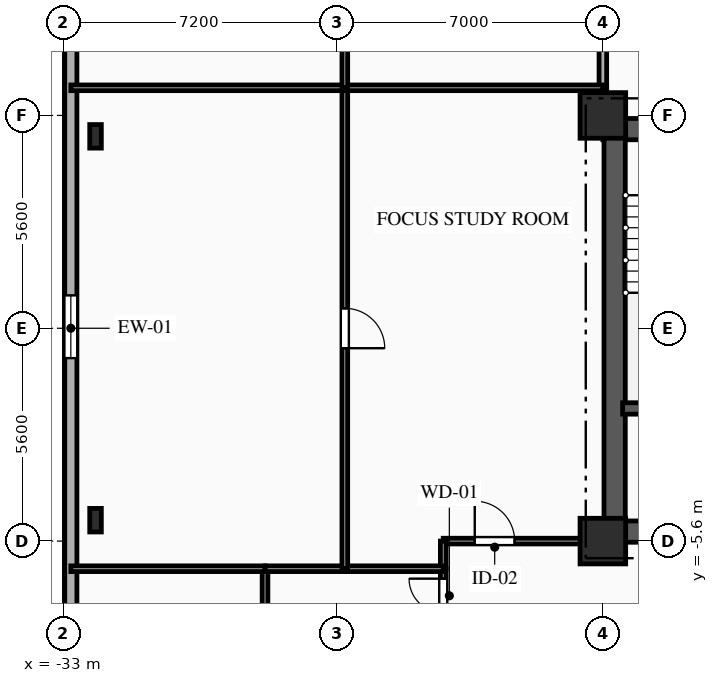
"""IFC4 building model, lengths in metres.
Left out: names, types, materials, properties, quantities, classifications, styles, units other than length and angle.
Written with IfcOpenShell. Run it as: python <this file> out.ifc"""

import sys

from ifc_helpers import new_model, si_unit, direction, frame, frame_2d, origin, origin_2d, place, context, subcontext, project, spatial, rectangle, i_section, extrude, element, fill, save


model = new_model("IFC4")
c1 = context("Model", 3, precision=1e-05, world=origin(), true_north=direction((0.0, 1.0)))
c2 = subcontext(c1, "Body", "Model", "MODEL_VIEW")
j1 = project(units=[si_unit("LENGTHUNIT", "METRE"), si_unit("PLANEANGLEUNIT", "RADIAN")], contexts=[c1])
p1 = place(None, origin())
s1 = spatial("IfcSite", under=j1, at=p1, CompositionType="ELEMENT")
p2 = place(p1, origin())
s2 = spatial("IfcBuilding", under=s1, at=p2, CompositionType="ELEMENT")
p3 = place(p2, frame((0.0, 0.0, 67.2)))
s3 = spatial("IfcBuildingStorey", under=s2, at=p3, CompositionType="ELEMENT", Elevation=67.2)
for number, where, z_axis, x_axis in (
    (1, (-18.8, -5.6, 0.0), (0.0, 0.0, 1.0), (1.0, 0.0, 0.0)),
    (2, (-18.8, 5.6, 0.0), (0.0, 0.0, 1.0), (1.0, 0.0, 0.0)),
):
    element("IfcColumn", number, at=place(p3, frame(where, z_axis=z_axis, x_axis=x_axis)), inside=s3, PredefinedType="COLUMN", context=c2, shape_type="SweptSolid", body=[
        extrude(rectangle(XDim=1.2, YDim=1.2, at=origin_2d()), origin(), (0.0, 0.0, 1.0), 3.35),
    ])
for number, where, z_axis, x_axis in (
    (3, (-32.15, 5.05, 0.0), (0.0, 0.0, 1.0), (1.0, 0.0, 0.0)),
    (4, (-32.15, -5.05, 0.0), (0.0, 0.0, 1.0), (1.0, 0.0, 0.0)),
):
    element("IfcColumn", number, at=place(p3, frame(where, z_axis=z_axis, x_axis=x_axis)), inside=s3, PredefinedType="COLUMN", context=c2, shape_type="SweptSolid", body=[
        extrude(i_section(OverallWidth=0.305, OverallDepth=0.62, WebThickness=0.021, FlangeThickness=0.04, FilletRadius=0.027, at=origin_2d()), origin(), (0.0, 0.0, 1.0), 3.35),
    ])
p4 = place(p3, frame((-32.8, -15.8, 0.0), z_axis=(0.0, 0.0, 1.0), x_axis=(0.0, 1.0, 0.0)))
e5 = element("IfcWall", 5, at=p4, inside=s3, PredefinedType="SOLIDWALL", context=c2, shape_type="SweptSolid", body=[
    extrude(rectangle(XDim=31.6, YDim=0.32, at=frame_2d((15.8, 0.0))), origin(), (0.0, 0.0, 1.0), 3.035),
])
p5 = place(p4, frame((4.175, 0.0, 0.85)))
e6 = element("IfcOpeningElement", 6, at=p5, cuts=e5, PredefinedType="OPENING", context=c2, shape_type="SweptSolid", body=[
    extrude(rectangle(XDim=1.65, YDim=1.85, at=frame_2d((0.825, 0.925))), frame((0.0, 0.17, 0.0), z_axis=(0.0, -1.0, 0.0), x_axis=(1.0, 0.0, 0.0)), (0.0, 0.0, 1.0), 0.34),
])
p6 = place(p4, frame((15.015, 0.0, 0.85)))
e7 = element("IfcOpeningElement", 7, at=p6, cuts=e5, PredefinedType="OPENING", context=c2, shape_type="SweptSolid", body=[
    extrude(rectangle(XDim=1.65, YDim=1.85, at=frame_2d((0.825, 0.925))), frame((0.0, 0.17, 0.0), z_axis=(0.0, -1.0, 0.0), x_axis=(1.0, 0.0, 0.0)), (0.0, 0.0, 1.0), 0.34),
])
p7 = place(p4, frame((25.855, 0.0, 0.85)))
e8 = element("IfcOpeningElement", 8, at=p7, cuts=e5, PredefinedType="OPENING", context=c2, shape_type="SweptSolid", body=[
    extrude(rectangle(XDim=1.65, YDim=1.85, at=frame_2d((0.825, 0.925))), frame((0.0, 0.17, 0.0), z_axis=(0.0, -1.0, 0.0), x_axis=(1.0, 0.0, 0.0)), (0.0, 0.0, 1.0), 0.34),
])
p8 = place(p3, frame((-18.8, 5.24, 0.0), z_axis=(0.0, 0.0, 1.0), x_axis=(1.0, 0.0, 0.0)))
e9 = element("IfcWall", 9, at=p8, inside=s3, PredefinedType="SHEAR", context=c2, shape_type="SweptSolid", body=[
    extrude(rectangle(XDim=9.6, YDim=0.56, at=frame_2d((4.8, 0.0))), origin(), (0.0, 0.0, 1.0), 3.035),
])
p9 = place(p8, frame((1.55, 0.0, 0.0)))
e10 = element("IfcOpeningElement", 10, at=p9, cuts=e9, PredefinedType="OPENING", context=c2, shape_type="SweptSolid", body=[
    extrude(rectangle(XDim=1.1, YDim=2.15, at=frame_2d((0.55, 1.075))), frame((0.0, 0.29, 0.0), z_axis=(0.0, -1.0, 0.0), x_axis=(1.0, 0.0, 0.0)), (0.0, 0.0, 1.0), 0.58),
])
p10 = place(p8, frame((4.775, 0.0, 0.0)))
e11 = element("IfcOpeningElement", 11, at=p10, cuts=e9, PredefinedType="OPENING", context=c2, shape_type="SweptSolid", body=[
    extrude(rectangle(XDim=1.05, YDim=2.1, at=frame_2d((0.525, 1.05))), frame((0.0, 0.29, 0.0), z_axis=(0.0, -1.0, 0.0), x_axis=(1.0, 0.0, 0.0)), (0.0, 0.0, 1.0), 0.58),
])
p11 = place(p3, frame((-18.8, -5.35, 0.0), z_axis=(0.0, 0.0, 1.0), x_axis=(1.0, 0.0, 0.0)))
e12 = element("IfcWall", 12, at=p11, inside=s3, PredefinedType="SHEAR", context=c2, shape_type="SweptSolid", body=[
    extrude(rectangle(XDim=9.6, YDim=0.56, at=frame_2d((4.8, 0.0))), origin(), (0.0, 0.0, 1.0), 3.035),
])
p12 = place(p11, frame((1.05, 0.0, 0.0)))
e13 = element("IfcOpeningElement", 13, at=p12, cuts=e12, PredefinedType="OPENING", context=c2, shape_type="SweptSolid", body=[
    extrude(rectangle(XDim=0.9, YDim=2.1, at=frame_2d((0.45, 1.05))), frame((0.0, 0.29, 0.0), z_axis=(0.0, -1.0, 0.0), x_axis=(1.0, 0.0, 0.0)), (0.0, 0.0, 1.0), 0.58),
])
p13 = place(p3, frame((-18.49, -5.05, 0.0), z_axis=(0.0, 0.0, 1.0), x_axis=(0.0, 1.0, 0.0)))
e14 = element("IfcWall", 14, at=p13, inside=s3, PredefinedType="SHEAR", context=c2, shape_type="SweptSolid", body=[
    extrude(rectangle(XDim=10.1, YDim=0.56, at=frame_2d((5.05, 0.0))), origin(), (0.0, 0.0, 1.0), 3.035),
])
p14 = place(p3, frame((-18.28, -2.11, 0.0), z_axis=(0.0, 0.0, 1.0), x_axis=(1.0, 0.0, 0.0)))
e15 = element("IfcWall", 15, at=p14, inside=s3, PredefinedType="SHEAR", context=c2, shape_type="SweptSolid", body=[
    extrude(rectangle(XDim=3.18, YDim=0.3, at=frame_2d((1.59, 0.0))), origin(), (0.0, 0.0, 1.0), 3.035),
])
p15 = place(p3, frame((-18.8, 6.327, 0.0), z_axis=(0.0, 0.0, 1.0), x_axis=(0.0, -1.0, 0.0)))
e16 = element("IfcWall", 16, at=p15, inside=s3, PredefinedType="PARTITIONING", context=c2, shape_type="SweptSolid", body=[
    extrude(rectangle(XDim=0.727, YDim=0.2, at=frame_2d((0.363, 0.0))), origin(), (0.0, 0.0, 1.0), 2.52),
])
p16 = place(p3, frame((-18.8, 8.5, 0.0), z_axis=(0.0, 0.0, 1.0), x_axis=(0.0, -1.0, 0.0)))
e17 = element("IfcWall", 17, at=p16, inside=s3, PredefinedType="PARTITIONING", context=c2, shape_type="SweptSolid", body=[
    extrude(rectangle(XDim=2.173, YDim=0.2, at=frame_2d((1.086, 0.0))), origin(), (0.0, 0.0, 1.0), 2.52),
])
p17 = place(p3, frame((-23.0, -7.75, 0.0), z_axis=(0.0, 0.0, 1.0), x_axis=(0.0, 1.0, 0.0)))
e18 = element("IfcWall", 18, at=p17, inside=s3, PredefinedType="PARTITIONING", context=c2, shape_type="SweptSolid", body=[
    extrude(rectangle(XDim=1.423, YDim=0.15, at=frame_2d((0.711, 0.0))), origin(), (0.0, 0.0, 1.0), 3.035),
])
p18 = place(p17, frame((0.261, 0.0, 0.0)))
e19 = element("IfcOpeningElement", 19, at=p18, cuts=e18, PredefinedType="OPENING", context=c2, shape_type="SweptSolid", body=[
    extrude(rectangle(XDim=0.9, YDim=2.1, at=frame_2d((0.45, 1.05))), frame((0.0, 0.085, 0.0), z_axis=(0.0, -1.0, 0.0), x_axis=(1.0, 0.0, 0.0)), (0.0, 0.0, 1.0), 0.17),
])
p19 = place(p3, frame((-23.0, -5.6, 0.0), z_axis=(0.0, 0.0, 1.0), x_axis=(1.0, 0.0, 0.0)))
e20 = element("IfcWall", 20, at=p19, inside=s3, PredefinedType="PARTITIONING", context=c2, shape_type="SweptSolid", body=[
    extrude(rectangle(XDim=4.2, YDim=0.15, at=frame_2d((2.1, 0.0))), origin(), (0.0, 0.0, 1.0), 3.035),
])
p20 = place(p19, frame((0.829, 0.0, 0.0)))
e21 = element("IfcOpeningElement", 21, at=p20, cuts=e20, PredefinedType="OPENING", context=c2, shape_type="SweptSolid", body=[
    extrude(rectangle(XDim=1.05, YDim=2.15, at=frame_2d((0.525, 1.075))), frame((0.0, 0.085, 0.0), z_axis=(0.0, -1.0, 0.0), x_axis=(1.0, 0.0, 0.0)), (0.0, 0.0, 1.0), 0.17),
])
p21 = place(p3, frame((-23.0, -6.327, 0.0), z_axis=(0.0, 0.0, 1.0), x_axis=(0.0, 1.0, 0.0)))
e22 = element("IfcWall", 22, at=p21, inside=s3, PredefinedType="PARTITIONING", context=c2, shape_type="SweptSolid", body=[
    extrude(rectangle(XDim=0.727, YDim=0.15, at=frame_2d((0.363, 0.0))), origin(), (0.0, 0.0, 1.0), 3.035),
])
p22 = place(p3, frame((-27.69, -6.327, 0.0), z_axis=(0.0, 0.0, 1.0), x_axis=(0.0, -1.0, 0.0)))
e23 = element("IfcWall", 23, at=p22, inside=s3, PredefinedType="PARTITIONING", context=c2, shape_type="SweptSolid", body=[
    extrude(rectangle(XDim=13.073, YDim=0.15, at=frame_2d((6.537, 0.0))), origin(), (0.0, 0.0, 1.0), 3.035),
])
p23 = place(p22, frame((3.296, 0.0, 0.0)))
e24 = element("IfcOpeningElement", 24, at=p23, cuts=e23, PredefinedType="OPENING", context=c2, shape_type="SweptSolid", body=[
    extrude(rectangle(XDim=1.05, YDim=2.15, at=frame_2d((0.525, 1.075))), frame((0.0, 0.085, 0.0), z_axis=(0.0, -1.0, 0.0), x_axis=(1.0, 0.0, 0.0)), (0.0, 0.0, 1.0), 0.17),
])
p24 = place(p3, frame((-32.8, -6.327, 0.0), z_axis=(0.0, 0.0, 1.0), x_axis=(1.0, 0.0, 0.0)))
e25 = element("IfcWall", 25, at=p24, inside=s3, PredefinedType="PARTITIONING", context=c2, shape_type="SweptSolid", body=[
    extrude(rectangle(XDim=5.11, YDim=0.15, at=frame_2d((2.555, 0.0))), origin(), (0.0, 0.0, 1.0), 3.035),
])
p25 = place(p3, frame((-27.69, -6.327, 0.0), z_axis=(0.0, 0.0, 1.0), x_axis=(1.0, 0.0, 0.0)))
e26 = element("IfcWall", 26, at=p25, inside=s3, PredefinedType="PARTITIONING", context=c2, shape_type="SweptSolid", body=[
    extrude(rectangle(XDim=2.1, YDim=0.15, at=frame_2d((1.05, 0.0))), origin(), (0.0, 0.0, 1.0), 3.035),
])
p26 = place(p3, frame((-25.59, -6.327, 0.0), z_axis=(0.0, 0.0, 1.0), x_axis=(1.0, 0.0, 0.0)))
e27 = element("IfcWall", 27, at=p26, inside=s3, PredefinedType="PARTITIONING", context=c2, shape_type="SweptSolid", body=[
    extrude(rectangle(XDim=2.59, YDim=0.15, at=frame_2d((1.295, 0.0))), origin(), (0.0, 0.0, 1.0), 3.035),
])
p27 = place(p3, frame((-25.59, 6.327, 0.0), z_axis=(0.0, 0.0, 1.0), x_axis=(0.0, -1.0, 0.0)))
e28 = element("IfcWall", 28, at=p27, inside=s3, PredefinedType="PARTITIONING", context=c2, shape_type="SweptSolid", body=[
    extrude(rectangle(XDim=12.654, YDim=0.15, at=frame_2d((6.327, 0.0))), origin(), (0.0, 0.0, 1.0), 2.69),
])
p28 = place(p27, frame((5.802, 0.0, 0.0)))
e29 = element("IfcOpeningElement", 29, at=p28, cuts=e28, PredefinedType="OPENING", context=c2, shape_type="SweptSolid", body=[
    extrude(rectangle(XDim=1.05, YDim=2.15, at=frame_2d((0.525, 1.075))), frame((0.0, 0.085, 0.0), z_axis=(0.0, -1.0, 0.0), x_axis=(1.0, 0.0, 0.0)), (0.0, 0.0, 1.0), 0.17),
])
p29 = place(p3, frame((-32.8, 6.327, 0.0), z_axis=(0.0, 0.0, 1.0), x_axis=(1.0, 0.0, 0.0)))
e30 = element("IfcWall", 30, at=p29, inside=s3, PredefinedType="PARTITIONING", context=c2, shape_type="SweptSolid", body=[
    extrude(rectangle(XDim=7.21, YDim=0.15, at=frame_2d((3.605, 0.0))), origin(), (0.0, 0.0, 1.0), 3.035),
])
p30 = place(p3, frame((-25.59, 6.327, 0.0), z_axis=(0.0, 0.0, 1.0), x_axis=(1.0, 0.0, 0.0)))
e31 = element("IfcWall", 31, at=p30, inside=s3, PredefinedType="PARTITIONING", context=c2, shape_type="SweptSolid", body=[
    extrude(rectangle(XDim=6.79, YDim=0.15, at=frame_2d((3.395, 0.0))), origin(), (0.0, 0.0, 1.0), 3.035),
])
p31 = place(p3, frame((-25.59, 19.4, 0.0), z_axis=(0.0, 0.0, 1.0), x_axis=(0.0, -1.0, 0.0)))
e32 = element("IfcWall", 32, at=p31, inside=s3, PredefinedType="PARTITIONING", context=c2, shape_type="SweptSolid", body=[
    extrude(rectangle(XDim=13.073, YDim=0.15, at=frame_2d((6.537, 0.0))), origin(), (0.0, 0.0, 1.0), 2.69),
])
p32 = place(p31, frame((8.727, 0.0, 0.0)))
e33 = element("IfcOpeningElement", 33, at=p32, cuts=e32, PredefinedType="OPENING", context=c2, shape_type="SweptSolid", body=[
    extrude(rectangle(XDim=1.05, YDim=2.15, at=frame_2d((0.525, 1.075))), frame((0.0, 0.085, 0.0), z_axis=(0.0, -1.0, 0.0), x_axis=(1.0, 0.0, 0.0)), (0.0, 0.0, 1.0), 0.17),
])
p33 = place(p6, origin())
e34 = element("IfcWindow", 34, at=p33, inside=s3, PartitioningType="SINGLE_PANEL", PredefinedType="WINDOW", context=c2, shape_type="SweptSolid", body=[
    extrude(rectangle(XDim=1.65, YDim=1.85, at=frame_2d((0.825, 0.925))), frame((0.0, 0.03, 0.0), z_axis=(0.0, -1.0, 0.0), x_axis=(1.0, 0.0, 0.0)), (0.0, 0.0, 1.0), 0.06),
])
fill(e7, e34)
p34 = place(p18, origin())
e35 = element("IfcDoor", 35, at=p34, inside=s3, OperationType="SINGLE_SWING_RIGHT", PredefinedType="DOOR", context=c2, shape_type="SweptSolid", body=[
    extrude(rectangle(XDim=0.9, YDim=2.1, at=frame_2d((0.45, 1.05))), frame((0.0, 0.025, 0.0), z_axis=(0.0, -1.0, 0.0), x_axis=(1.0, 0.0, 0.0)), (0.0, 0.0, 1.0), 0.05),
])
fill(e19, e35)
p35 = place(p20, origin())
e36 = element("IfcDoor", 36, at=p35, inside=s3, OperationType="SINGLE_SWING_LEFT", PredefinedType="DOOR", context=c2, shape_type="SweptSolid", body=[
    extrude(rectangle(XDim=1.05, YDim=2.15, at=frame_2d((0.525, 1.075))), frame((0.0, 0.025, 0.0), z_axis=(0.0, -1.0, 0.0), x_axis=(1.0, 0.0, 0.0)), (0.0, 0.0, 1.0), 0.05),
])
fill(e21, e36)
p36 = place(p28, origin())
e37 = element("IfcDoor", 37, at=p36, inside=s3, OperationType="SINGLE_SWING_RIGHT", PredefinedType="DOOR", context=c2, shape_type="SweptSolid", body=[
    extrude(rectangle(XDim=1.05, YDim=2.15, at=frame_2d((0.525, 1.075))), frame((0.0, 0.025, 0.0), z_axis=(0.0, -1.0, 0.0), x_axis=(1.0, 0.0, 0.0)), (0.0, 0.0, 1.0), 0.05),
])
fill(e29, e37)
save(model, sys.argv[1])
